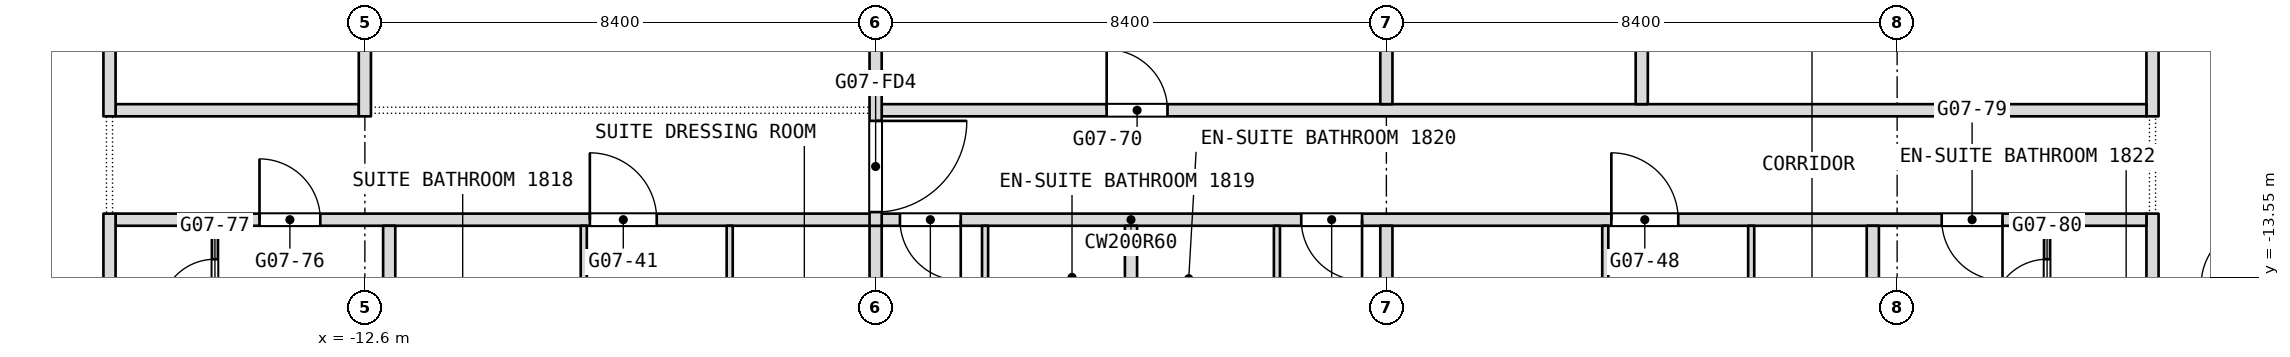
"""IFC4 building model, lengths in metres.
Left out: names, types, materials, properties, quantities, classifications, styles, units other than length and angle.
Written with IfcOpenShell. Run it as: python <this file> out.ifc"""

import sys

from ifc_helpers import new_model, si_unit, direction, frame, frame_2d, origin, place, context, subcontext, project, spatial, rectangle, extrude, element, fill, save


model = new_model("IFC4")
c1 = context("Model", 3, precision=1e-05, world=origin(), true_north=direction((0.0, 1.0)))
c2 = subcontext(c1, "Body", "Model", "MODEL_VIEW")
j1 = project(units=[si_unit("LENGTHUNIT", "METRE"), si_unit("PLANEANGLEUNIT", "RADIAN")], contexts=[c1])
p1 = place(None, origin())
s1 = spatial("IfcSite", under=j1, at=p1, CompositionType="ELEMENT")
p2 = place(p1, origin())
s2 = spatial("IfcBuilding", under=s1, at=p2, CompositionType="ELEMENT")
p3 = place(p2, frame((0.0, 0.0, 79.7)))
s3 = spatial("IfcBuildingStorey", under=s2, at=p3, CompositionType="ELEMENT", Elevation=79.7)
p4 = place(p3, frame((16.8, -17.143, 0.0), z_axis=(0.0, 0.0, 1.0), x_axis=(0.0, 1.0, 0.0)))
e1 = element("IfcWall", 1, at=p4, inside=s3, PredefinedType="PARTITIONING", context=c2, shape_type="SweptSolid", body=[
    extrude(rectangle(XDim=4.643, YDim=0.2, at=frame_2d((2.322, 0.0))), origin(), (0.0, 0.0, 1.0), 3.34),
])
p5 = place(p4, frame((0.771, 0.0, 0.0)))
e2 = element("IfcOpeningElement", 2, at=p5, cuts=e1, PredefinedType="OPENING", context=c2, shape_type="SweptSolid", body=[
    extrude(rectangle(XDim=0.9, YDim=2.1, at=frame_2d((0.45, 1.05))), frame((0.0, 0.1, 0.0), z_axis=(0.0, -1.0, 0.0), x_axis=(1.0, 0.0, 0.0)), (0.0, 0.0, 1.0), 0.2),
])
p6 = place(p3, frame((16.8, -10.9, 0.0), z_axis=(0.0, 0.0, 1.0), x_axis=(0.0, 1.0, 0.0)))
e3 = element("IfcWall", 3, at=p6, inside=s3, PredefinedType="PARTITIONING", context=c2, shape_type="SweptSolid", body=[
    extrude(rectangle(XDim=7.3, YDim=0.2, at=frame_2d((3.65, 0.0))), origin(), (0.0, 0.0, 1.0), 3.34),
])
p7 = place(p6, frame((3.15, 0.0, 0.0)))
e4 = element("IfcOpeningElement", 4, at=p7, cuts=e3, PredefinedType="OPENING", context=c2, shape_type="SweptSolid", body=[
    extrude(rectangle(XDim=1.0, YDim=2.1, at=frame_2d((0.5, 1.05))), frame((0.0, 0.1, 0.0), z_axis=(0.0, -1.0, 0.0), x_axis=(1.0, 0.0, 0.0)), (0.0, 0.0, 1.0), 0.2),
])
p8 = place(p3, frame((15.066, -14.9, 0.0), z_axis=(0.0, 0.0, 1.0), x_axis=(0.0, 1.0, 0.0)))
e5 = element("IfcWall", 5, at=p8, inside=s3, PredefinedType="PARTITIONING", context=c2, shape_type="SweptSolid", body=[
    extrude(rectangle(XDim=2.2, YDim=0.1, at=frame_2d((1.1, 0.0))), origin(), (0.0, 0.0, 1.0), 3.34),
])
p9 = place(p8, frame((0.75, 0.0, 0.0)))
e6 = element("IfcOpeningElement", 6, at=p9, cuts=e5, PredefinedType="OPENING", context=c2, shape_type="SweptSolid", body=[
    extrude(rectangle(XDim=0.9, YDim=2.1, at=frame_2d((0.45, 1.05))), frame((0.0, 0.05, 0.0), z_axis=(0.0, -1.0, 0.0), x_axis=(1.0, 0.0, 0.0)), (0.0, 0.0, 1.0), 0.1),
])
p10 = place(p3, frame((-16.7, -12.6, 0.0), z_axis=(0.0, 0.0, 1.0), x_axis=(1.0, 0.0, 0.0)))
e7 = element("IfcWall", 7, at=p10, inside=s3, PredefinedType="PARTITIONING", context=c2, shape_type="SweptSolid", body=[
    extrude(rectangle(XDim=33.4, YDim=0.2, at=frame_2d((16.7, 0.0))), origin(), (0.0, 0.0, 1.0), 3.34),
])
p11 = place(p10, frame((7.8, 0.0, 0.0)))
e8 = element("IfcOpeningElement", 8, at=p11, cuts=e7, PredefinedType="OPENING", context=c2, shape_type="SweptSolid", body=[
    extrude(rectangle(XDim=1.1, YDim=2.1, at=frame_2d((0.55, 1.05))), frame((0.0, 0.1, 0.0), z_axis=(0.0, -1.0, 0.0), x_axis=(1.0, 0.0, 0.0)), (0.0, 0.0, 1.0), 0.2),
])
p12 = place(p10, frame((12.9, 0.0, 0.0)))
e9 = element("IfcOpeningElement", 9, at=p12, cuts=e7, PredefinedType="OPENING", context=c2, shape_type="SweptSolid", body=[
    extrude(rectangle(XDim=1.0, YDim=2.1, at=frame_2d((0.5, 1.05))), frame((0.0, 0.1, 0.0), z_axis=(0.0, -1.0, 0.0), x_axis=(1.0, 0.0, 0.0)), (0.0, 0.0, 1.0), 0.2),
])
p13 = place(p10, frame((19.5, 0.0, 0.0)))
e10 = element("IfcOpeningElement", 10, at=p13, cuts=e7, PredefinedType="OPENING", context=c2, shape_type="SweptSolid", body=[
    extrude(rectangle(XDim=1.0, YDim=2.1, at=frame_2d((0.5, 1.05))), frame((0.0, 0.1, 0.0), z_axis=(0.0, -1.0, 0.0), x_axis=(1.0, 0.0, 0.0)), (0.0, 0.0, 1.0), 0.2),
])
p14 = place(p10, frame((24.6, 0.0, 0.0)))
e11 = element("IfcOpeningElement", 11, at=p14, cuts=e7, PredefinedType="OPENING", context=c2, shape_type="SweptSolid", body=[
    extrude(rectangle(XDim=1.1, YDim=2.1, at=frame_2d((0.55, 1.05))), frame((0.0, 0.1, 0.0), z_axis=(0.0, -1.0, 0.0), x_axis=(1.0, 0.0, 0.0)), (0.0, 0.0, 1.0), 0.2),
])
p15 = place(p10, frame((2.367, 0.0, 0.0)))
e12 = element("IfcOpeningElement", 12, at=p15, cuts=e7, PredefinedType="OPENING", context=c2, shape_type="SweptSolid", body=[
    extrude(rectangle(XDim=1.0, YDim=2.1, at=frame_2d((0.5, 1.05))), frame((0.0, 0.1, 0.0), z_axis=(0.0, -1.0, 0.0), x_axis=(1.0, 0.0, 0.0)), (0.0, 0.0, 1.0), 0.2),
])
p16 = place(p10, frame((30.033, 0.0, 0.0)))
e13 = element("IfcOpeningElement", 13, at=p16, cuts=e7, PredefinedType="OPENING", context=c2, shape_type="SweptSolid", body=[
    extrude(rectangle(XDim=1.0, YDim=2.1, at=frame_2d((0.5, 1.05))), frame((0.0, 0.1, 0.0), z_axis=(0.0, -1.0, 0.0), x_axis=(1.0, 0.0, 0.0)), (0.0, 0.0, 1.0), 0.2),
])
p17 = place(p3, frame((12.2, -15.8, 0.0), z_axis=(0.0, 0.0, 1.0), x_axis=(0.0, 1.0, 0.0)))
e14 = element("IfcWall", 14, at=p17, inside=s3, PredefinedType="PARTITIONING", context=c2, shape_type="SweptSolid", body=[
    extrude(rectangle(XDim=3.1, YDim=0.2, at=frame_2d((1.55, 0.0))), origin(), (0.0, 0.0, 1.0), 3.34),
])
p18 = place(p3, frame((-16.7, -10.8, 0.0), z_axis=(0.0, 0.0, 1.0), x_axis=(1.0, 0.0, 0.0)))
e15 = element("IfcWall", 15, at=p18, inside=s3, PredefinedType="PARTITIONING", context=c2, shape_type="SweptSolid", body=[
    extrude(rectangle(XDim=4.0, YDim=0.2, at=frame_2d((2.0, 0.0))), origin(), (0.0, 0.0, 1.0), 3.34),
])
p19 = place(p3, frame((-4.1, -10.8, 0.0), z_axis=(0.0, 0.0, 1.0), x_axis=(1.0, 0.0, 0.0)))
e16 = element("IfcWall", 16, at=p19, inside=s3, PredefinedType="PARTITIONING", context=c2, shape_type="SweptSolid", body=[
    extrude(rectangle(XDim=20.8, YDim=0.2, at=frame_2d((10.4, 0.0))), origin(), (0.0, 0.0, 1.0), 3.34),
])
p20 = place(p19, frame((3.7, 0.0, 0.0)))
e17 = element("IfcOpeningElement", 17, at=p20, cuts=e16, PredefinedType="OPENING", context=c2, shape_type="SweptSolid", body=[
    extrude(rectangle(XDim=1.0, YDim=2.1, at=frame_2d((0.5, 1.05))), frame((0.0, 0.1, 0.0), z_axis=(0.0, -1.0, 0.0), x_axis=(1.0, 0.0, 0.0)), (0.0, 0.0, 1.0), 0.2),
])
p21 = place(p3, frame((10.2, -16.25, 0.0), z_axis=(0.0, 0.0, 1.0), x_axis=(0.0, 1.0, 0.0)))
e18 = element("IfcWall", 18, at=p21, inside=s3, PredefinedType="PARTITIONING", context=c2, shape_type="SweptSolid", body=[
    extrude(rectangle(XDim=3.55, YDim=0.1, at=frame_2d((1.775, 0.0))), origin(), (0.0, 0.0, 1.0), 3.34),
])
p22 = place(p3, frame((8.4, -10.7, 0.0), z_axis=(0.0, 0.0, 1.0), x_axis=(0.0, 1.0, 0.0)))
e19 = element("IfcWall", 19, at=p22, inside=s3, PredefinedType="PARTITIONING", context=c2, shape_type="SweptSolid", body=[
    extrude(rectangle(XDim=3.6, YDim=0.2, at=frame_2d((1.8, 0.0))), origin(), (0.0, 0.0, 1.0), 3.34),
])
p23 = place(p3, frame((7.8, -16.15, 0.0), z_axis=(0.0, 0.0, 1.0), x_axis=(0.0, 1.0, 0.0)))
e20 = element("IfcWall", 20, at=p23, inside=s3, PredefinedType="PARTITIONING", context=c2, shape_type="SweptSolid", body=[
    extrude(rectangle(XDim=3.45, YDim=0.1, at=frame_2d((1.725, 0.0))), origin(), (0.0, 0.0, 1.0), 3.34),
])
p24 = place(p3, frame((4.2, -17.7, 0.0), z_axis=(0.0, 0.0, 1.0), x_axis=(0.0, 1.0, 0.0)))
e21 = element("IfcWall", 21, at=p24, inside=s3, PredefinedType="PARTITIONING", context=c2, shape_type="SweptSolid", body=[
    extrude(rectangle(XDim=5.0, YDim=0.2, at=frame_2d((2.5, 0.0))), origin(), (0.0, 0.0, 1.0), 3.34),
])
p25 = place(p3, frame((4.2, -10.7, 0.0), z_axis=(0.0, 0.0, 1.0), x_axis=(0.0, 1.0, 0.0)))
e22 = element("IfcWall", 22, at=p25, inside=s3, PredefinedType="PARTITIONING", context=c2, shape_type="SweptSolid", body=[
    extrude(rectangle(XDim=8.8, YDim=0.2, at=frame_2d((4.4, 0.0))), origin(), (0.0, 0.0, 1.0), 3.34),
])
p26 = place(p3, frame((2.4, -15.325, 0.0), z_axis=(0.0, 0.0, 1.0), x_axis=(0.0, 1.0, 0.0)))
e23 = element("IfcWall", 23, at=p26, inside=s3, PredefinedType="PARTITIONING", context=c2, shape_type="SweptSolid", body=[
    extrude(rectangle(XDim=2.625, YDim=0.1, at=frame_2d((1.312, 0.0))), origin(), (0.0, 0.0, 1.0), 3.34),
])
p27 = place(p3, frame((0.0, -17.7, 0.0), z_axis=(0.0, 0.0, 1.0), x_axis=(0.0, 1.0, 0.0)))
e24 = element("IfcWall", 24, at=p27, inside=s3, PredefinedType="PARTITIONING", context=c2, shape_type="SweptSolid", body=[
    extrude(rectangle(XDim=5.0, YDim=0.2, at=frame_2d((2.5, 0.0))), origin(), (0.0, 0.0, 1.0), 3.34),
])
p28 = place(p3, frame((-2.4, -15.425, 0.0), z_axis=(0.0, 0.0, 1.0), x_axis=(0.0, 1.0, 0.0)))
e25 = element("IfcWall", 25, at=p28, inside=s3, PredefinedType="PARTITIONING", context=c2, shape_type="SweptSolid", body=[
    extrude(rectangle(XDim=2.725, YDim=0.1, at=frame_2d((1.363, 0.0))), origin(), (0.0, 0.0, 1.0), 3.34),
])
p29 = place(p3, frame((-4.2, -17.7, 0.0), z_axis=(0.0, 0.0, 1.0), x_axis=(0.0, 1.0, 0.0)))
e26 = element("IfcWall", 26, at=p29, inside=s3, PredefinedType="PARTITIONING", context=c2, shape_type="SweptSolid", body=[
    extrude(rectangle(XDim=5.0, YDim=0.2, at=frame_2d((2.5, 0.0))), origin(), (0.0, 0.0, 1.0), 3.34),
])
p30 = place(p3, frame((-4.2, -12.7, 0.0), z_axis=(0.0, 0.0, 1.0), x_axis=(0.0, 1.0, 0.0)))
e27 = element("IfcWall", 27, at=p30, inside=s3, PredefinedType="PARTITIONING", context=c2, shape_type="SweptSolid", body=[
    extrude(rectangle(XDim=12.7, YDim=0.2, at=frame_2d((6.35, 0.0))), origin(), (0.0, 0.0, 1.0), 3.34),
])
p31 = place(p30, frame((11.05, 0.0, 0.0)))
e28 = element("IfcOpeningElement", 28, at=p31, cuts=e27, PredefinedType="OPENING", context=c2, shape_type="SweptSolid", body=[
    extrude(rectangle(XDim=1.5, YDim=2.1, at=frame_2d((0.75, 1.05))), frame((0.0, 0.1, 0.0), z_axis=(0.0, -1.0, 0.0), x_axis=(1.0, 0.0, 0.0)), (0.0, 0.0, 1.0), 0.2),
])
p32 = place(p30, frame((0.225, 0.0, 0.0)))
e29 = element("IfcOpeningElement", 29, at=p32, cuts=e27, PredefinedType="OPENING", context=c2, shape_type="SweptSolid", body=[
    extrude(rectangle(XDim=1.5, YDim=2.1, at=frame_2d((0.75, 1.05))), frame((0.0, 0.1, 0.0), z_axis=(0.0, -1.0, 0.0), x_axis=(1.0, 0.0, 0.0)), (0.0, 0.0, 1.0), 0.2),
])
p33 = place(p3, frame((-6.6, -16.25, 0.0), z_axis=(0.0, 0.0, 1.0), x_axis=(0.0, 1.0, 0.0)))
e30 = element("IfcWall", 30, at=p33, inside=s3, PredefinedType="PARTITIONING", context=c2, shape_type="SweptSolid", body=[
    extrude(rectangle(XDim=3.55, YDim=0.1, at=frame_2d((1.775, 0.0))), origin(), (0.0, 0.0, 1.0), 3.34),
])
p34 = place(p3, frame((-9.0, -16.15, 0.0), z_axis=(0.0, 0.0, 1.0), x_axis=(0.0, 1.0, 0.0)))
e31 = element("IfcWall", 31, at=p34, inside=s3, PredefinedType="PARTITIONING", context=c2, shape_type="SweptSolid", body=[
    extrude(rectangle(XDim=3.45, YDim=0.1, at=frame_2d((1.725, 0.0))), origin(), (0.0, 0.0, 1.0), 3.34),
])
p35 = place(p34, frame((0.94, 0.0, 0.0)))
e32 = element("IfcOpeningElement", 32, at=p35, cuts=e31, PredefinedType="OPENING", context=c2, shape_type="SweptSolid", body=[
    extrude(rectangle(XDim=0.9, YDim=2.1, at=frame_2d((0.45, 1.05))), frame((0.0, 0.05, 0.0), z_axis=(0.0, -1.0, 0.0), x_axis=(1.0, 0.0, 0.0)), (0.0, 0.0, 1.0), 0.1),
])
p36 = place(p3, frame((-12.2, -16.0, 0.0), z_axis=(0.0, 0.0, 1.0), x_axis=(0.0, 1.0, 0.0)))
e33 = element("IfcWall", 33, at=p36, inside=s3, PredefinedType="PARTITIONING", context=c2, shape_type="SweptSolid", body=[
    extrude(rectangle(XDim=3.3, YDim=0.2, at=frame_2d((1.65, 0.0))), origin(), (0.0, 0.0, 1.0), 3.34),
])
p37 = place(p3, frame((-12.6, -10.9, 0.0), z_axis=(0.0, 0.0, 1.0), x_axis=(0.0, 1.0, 0.0)))
e34 = element("IfcWall", 34, at=p37, inside=s3, PredefinedType="PARTITIONING", context=c2, shape_type="SweptSolid", body=[
    extrude(rectangle(XDim=5.6, YDim=0.2, at=frame_2d((2.8, 0.0))), origin(), (0.0, 0.0, 1.0), 3.34),
])
p38 = place(p3, frame((-15.066, -14.9, 0.0), z_axis=(0.0, 0.0, 1.0), x_axis=(0.0, 1.0, 0.0)))
e35 = element("IfcWall", 35, at=p38, inside=s3, PredefinedType="PARTITIONING", context=c2, shape_type="SweptSolid", body=[
    extrude(rectangle(XDim=2.2, YDim=0.1, at=frame_2d((1.1, 0.0))), origin(), (0.0, 0.0, 1.0), 3.34),
])
p39 = place(p38, frame((0.75, 0.0, 0.0)))
e36 = element("IfcOpeningElement", 36, at=p39, cuts=e35, PredefinedType="OPENING", context=c2, shape_type="SweptSolid", body=[
    extrude(rectangle(XDim=0.9, YDim=2.1, at=frame_2d((0.45, 1.05))), frame((0.0, 0.05, 0.0), z_axis=(0.0, -1.0, 0.0), x_axis=(1.0, 0.0, 0.0)), (0.0, 0.0, 1.0), 0.1),
])
p40 = place(p3, frame((-16.8, -17.143, 0.0), z_axis=(0.0, 0.0, 1.0), x_axis=(0.0, 1.0, 0.0)))
e37 = element("IfcWall", 37, at=p40, inside=s3, PredefinedType="PARTITIONING", context=c2, shape_type="SweptSolid", body=[
    extrude(rectangle(XDim=4.643, YDim=0.2, at=frame_2d((2.322, 0.0))), origin(), (0.0, 0.0, 1.0), 3.34),
])
p41 = place(p40, frame((0.772, 0.0, 0.0)))
e38 = element("IfcOpeningElement", 38, at=p41, cuts=e37, PredefinedType="OPENING", context=c2, shape_type="SweptSolid", body=[
    extrude(rectangle(XDim=0.9, YDim=2.1, at=frame_2d((0.45, 1.05))), frame((0.0, 0.1, 0.0), z_axis=(0.0, -1.0, 0.0), x_axis=(1.0, 0.0, 0.0)), (0.0, 0.0, 1.0), 0.2),
])
p42 = place(p3, frame((-16.8, -10.9, 0.0), z_axis=(0.0, 0.0, 1.0), x_axis=(0.0, 1.0, 0.0)))
e39 = element("IfcWall", 39, at=p42, inside=s3, PredefinedType="PARTITIONING", context=c2, shape_type="SweptSolid", body=[
    extrude(rectangle(XDim=9.0, YDim=0.2, at=frame_2d((4.5, 0.0))), origin(), (0.0, 0.0, 1.0), 3.34),
])
p43 = place(p9, origin())
e40 = element("IfcDoor", 40, at=p43, inside=s3, OperationType="SINGLE_SWING_RIGHT", PredefinedType="DOOR", context=c2, shape_type="SweptSolid", body=[
    extrude(rectangle(XDim=0.9, YDim=2.1, at=frame_2d((0.45, 1.05))), frame((0.0, 0.025, 0.0), z_axis=(0.0, -1.0, 0.0), x_axis=(1.0, 0.0, 0.0)), (0.0, 0.0, 1.0), 0.05),
])
fill(e6, e40)
p44 = place(p11, origin())
e41 = element("IfcDoor", 41, at=p44, inside=s3, OperationType="SINGLE_SWING_RIGHT", PredefinedType="DOOR", context=c2, shape_type="SweptSolid", body=[
    extrude(rectangle(XDim=1.1, YDim=2.1, at=frame_2d((0.55, 1.05))), frame((0.0, 0.025, 0.0), z_axis=(0.0, -1.0, 0.0), x_axis=(1.0, 0.0, 0.0)), (0.0, 0.0, 1.0), 0.05),
])
fill(e8, e41)
p45 = place(p12, origin())
e42 = element("IfcDoor", 42, at=p45, inside=s3, OperationType="SINGLE_SWING_RIGHT", PredefinedType="DOOR", context=c2, shape_type="SweptSolid", body=[
    extrude(rectangle(XDim=1.0, YDim=2.1, at=frame_2d((0.5, 1.05))), frame((0.0, 0.025, 0.0), z_axis=(0.0, -1.0, 0.0), x_axis=(1.0, 0.0, 0.0)), (0.0, 0.0, 1.0), 0.05),
])
fill(e9, e42)
p46 = place(p13, origin())
e43 = element("IfcDoor", 43, at=p46, inside=s3, OperationType="SINGLE_SWING_RIGHT", PredefinedType="DOOR", context=c2, shape_type="SweptSolid", body=[
    extrude(rectangle(XDim=1.0, YDim=2.1, at=frame_2d((0.5, 1.05))), frame((0.0, 0.025, 0.0), z_axis=(0.0, -1.0, 0.0), x_axis=(1.0, 0.0, 0.0)), (0.0, 0.0, 1.0), 0.05),
])
fill(e10, e43)
p47 = place(p14, origin())
e44 = element("IfcDoor", 44, at=p47, inside=s3, OperationType="SINGLE_SWING_RIGHT", PredefinedType="DOOR", context=c2, shape_type="SweptSolid", body=[
    extrude(rectangle(XDim=1.1, YDim=2.1, at=frame_2d((0.55, 1.05))), frame((0.0, 0.025, 0.0), z_axis=(0.0, -1.0, 0.0), x_axis=(1.0, 0.0, 0.0)), (0.0, 0.0, 1.0), 0.05),
])
fill(e11, e44)
p48 = place(p15, origin())
e45 = element("IfcDoor", 45, at=p48, inside=s3, OperationType="SINGLE_SWING_RIGHT", PredefinedType="DOOR", context=c2, shape_type="SweptSolid", body=[
    extrude(rectangle(XDim=1.0, YDim=2.1, at=frame_2d((0.5, 1.05))), frame((0.0, 0.025, 0.0), z_axis=(0.0, -1.0, 0.0), x_axis=(1.0, 0.0, 0.0)), (0.0, 0.0, 1.0), 0.05),
])
fill(e12, e45)
p49 = place(p16, origin())
e46 = element("IfcDoor", 46, at=p49, inside=s3, OperationType="SINGLE_SWING_LEFT", PredefinedType="DOOR", context=c2, shape_type="SweptSolid", body=[
    extrude(rectangle(XDim=1.0, YDim=2.1, at=frame_2d((0.5, 1.05))), frame((0.0, 0.025, 0.0), z_axis=(0.0, -1.0, 0.0), x_axis=(1.0, 0.0, 0.0)), (0.0, 0.0, 1.0), 0.05),
])
fill(e13, e46)
p50 = place(p20, origin())
e47 = element("IfcDoor", 47, at=p50, inside=s3, OperationType="SINGLE_SWING_RIGHT", PredefinedType="DOOR", context=c2, shape_type="SweptSolid", body=[
    extrude(rectangle(XDim=1.0, YDim=2.1, at=frame_2d((0.5, 1.05))), frame((0.0, 0.025, 0.0), z_axis=(0.0, -1.0, 0.0), x_axis=(1.0, 0.0, 0.0)), (0.0, 0.0, 1.0), 0.05),
])
fill(e17, e47)
p51 = place(p39, origin())
e48 = element("IfcDoor", 48, at=p51, inside=s3, OperationType="SINGLE_SWING_RIGHT", PredefinedType="DOOR", context=c2, shape_type="SweptSolid", body=[
    extrude(rectangle(XDim=0.9, YDim=2.1, at=frame_2d((0.45, 1.05))), frame((0.0, 0.025, 0.0), z_axis=(0.0, -1.0, 0.0), x_axis=(1.0, 0.0, 0.0)), (0.0, 0.0, 1.0), 0.05),
])
fill(e36, e48)
p52 = place(p32, origin())
e49 = element("IfcDoor", 49, at=p52, inside=s3, OperationType="DOUBLE_DOOR_DOUBLE_SWING", PredefinedType="DOOR", context=c2, shape_type="SweptSolid", body=[
    extrude(rectangle(XDim=1.5, YDim=2.1, at=frame_2d((0.75, 1.05))), frame((0.0, 0.025, 0.0), z_axis=(0.0, -1.0, 0.0), x_axis=(1.0, 0.0, 0.0)), (0.0, 0.0, 1.0), 0.05),
])
fill(e29, e49)
save(model, sys.argv[1])
